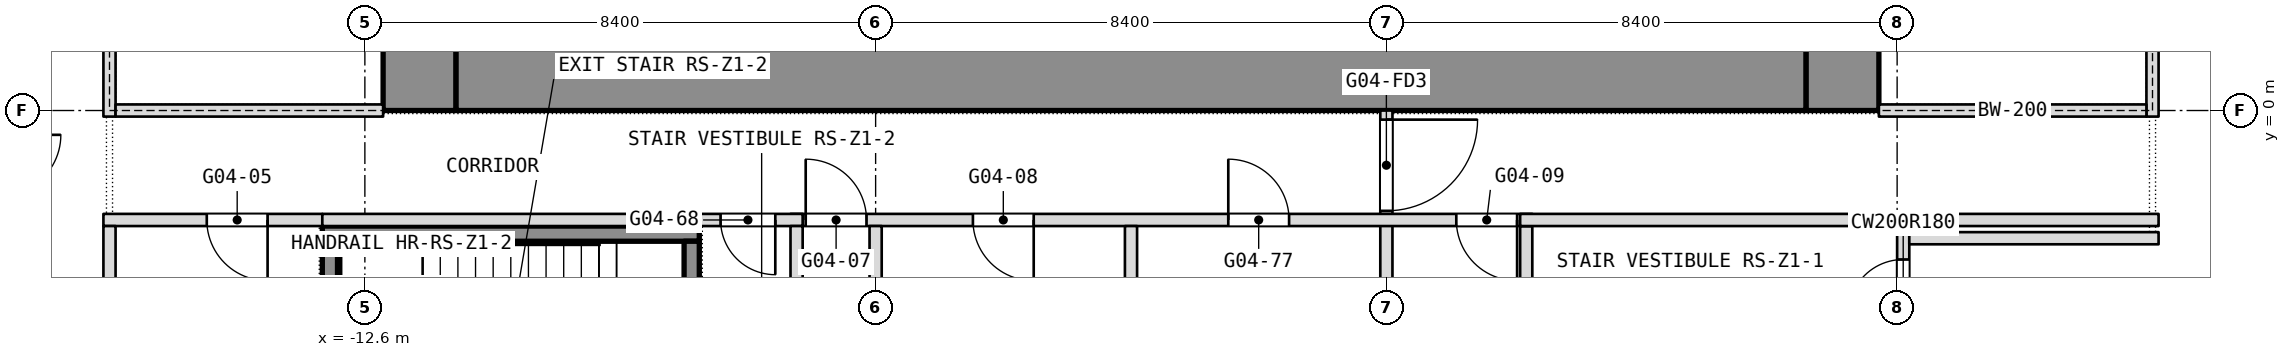
"""IFC4 building model, lengths in metres.
Left out: names, types, materials, properties, quantities, classifications, styles, units other than length and angle.
Written with IfcOpenShell. Run it as: python <this file> out.ifc"""

import sys

from ifc_helpers import new_model, si_unit, direction, frame, frame_2d, origin, place, context, subcontext, project, spatial, rectangle, extrude, element, fill, save


model = new_model("IFC4")
c1 = context("Model", 3, precision=1e-05, world=origin(), true_north=direction((0.0, 1.0)))
c2 = subcontext(c1, "Body", "Model", "MODEL_VIEW")
j1 = project(units=[si_unit("LENGTHUNIT", "METRE"), si_unit("PLANEANGLEUNIT", "RADIAN")], contexts=[c1])
p1 = place(None, origin())
s1 = spatial("IfcSite", under=j1, at=p1, CompositionType="ELEMENT")
p2 = place(p1, origin())
s2 = spatial("IfcBuilding", under=s1, at=p2, CompositionType="ELEMENT")
p3 = place(p2, frame((0.0, 0.0, 61.7)))
s3 = spatial("IfcBuildingStorey", under=s2, at=p3, CompositionType="ELEMENT", Elevation=61.7)
p4 = place(p3, frame((11.7, 0.0, 0.0), z_axis=(0.0, 0.0, 1.0), x_axis=(0.0, 1.0, 0.0)))
e1 = element("IfcWall", 1, at=p4, inside=s3, PredefinedType="SHEAR", context=c2, shape_type="SweptSolid", body=[
    extrude(rectangle(XDim=16.8, YDim=1.2, at=frame_2d((8.4, 0.0))), origin(), (0.0, 0.0, 1.0), 3.6),
])
p5 = place(p4, frame((1.762, 0.0, 0.0)))
e2 = element("IfcOpeningElement", 2, at=p5, cuts=e1, PredefinedType="OPENING", context=c2, shape_type="SweptSolid", body=[
    extrude(rectangle(XDim=0.9, YDim=2.1, at=frame_2d((0.45, 1.05))), frame((0.0, 0.6, 0.0), z_axis=(0.0, -1.0, 0.0), x_axis=(1.0, 0.0, 0.0)), (0.0, 0.0, 1.0), 1.2),
])
p6 = place(p4, frame((4.387, 0.0, 0.0)))
e3 = element("IfcOpeningElement", 3, at=p6, cuts=e1, PredefinedType="OPENING", context=c2, shape_type="SweptSolid", body=[
    extrude(rectangle(XDim=0.9, YDim=2.1, at=frame_2d((0.45, 1.05))), frame((0.0, 0.6, 0.0), z_axis=(0.0, -1.0, 0.0), x_axis=(1.0, 0.0, 0.0)), (0.0, 0.0, 1.0), 1.2),
])
p7 = place(p4, frame((6.825, 0.0, 0.0)))
e4 = element("IfcOpeningElement", 4, at=p7, cuts=e1, PredefinedType="OPENING", context=c2, shape_type="SweptSolid", body=[
    extrude(rectangle(XDim=1.2, YDim=2.1, at=frame_2d((0.6, 1.05))), frame((0.0, 0.6, 0.0), z_axis=(0.0, -1.0, 0.0), x_axis=(1.0, 0.0, 0.0)), (0.0, 0.0, 1.0), 1.2),
])
p8 = place(p4, frame((14.137, 0.0, 0.0)))
e5 = element("IfcOpeningElement", 5, at=p8, cuts=e1, PredefinedType="OPENING", context=c2, shape_type="SweptSolid", body=[
    extrude(rectangle(XDim=0.9, YDim=2.1, at=frame_2d((0.45, 1.05))), frame((0.0, 0.6, 0.0), z_axis=(0.0, -1.0, 0.0), x_axis=(1.0, 0.0, 0.0)), (0.0, 0.0, 1.0), 1.2),
])
p9 = place(p4, frame((11.512, 0.0, 0.0)))
e6 = element("IfcOpeningElement", 6, at=p9, cuts=e1, PredefinedType="OPENING", context=c2, shape_type="SweptSolid", body=[
    extrude(rectangle(XDim=0.9, YDim=2.1, at=frame_2d((0.45, 1.05))), frame((0.0, 0.6, 0.0), z_axis=(0.0, -1.0, 0.0), x_axis=(1.0, 0.0, 0.0)), (0.0, 0.0, 1.0), 1.2),
])
p10 = place(p4, frame((8.775, 0.0, 0.0)))
e7 = element("IfcOpeningElement", 7, at=p10, cuts=e1, PredefinedType="OPENING", context=c2, shape_type="SweptSolid", body=[
    extrude(rectangle(XDim=1.2, YDim=2.1, at=frame_2d((0.6, 1.05))), frame((0.0, 0.6, 0.0), z_axis=(0.0, -1.0, 0.0), x_axis=(1.0, 0.0, 0.0)), (0.0, 0.0, 1.0), 1.2),
])
p11 = place(p3, frame((-11.7, 0.0, 0.0), z_axis=(0.0, 0.0, 1.0), x_axis=(0.0, 1.0, 0.0)))
e8 = element("IfcWall", 8, at=p11, inside=s3, PredefinedType="SHEAR", context=c2, shape_type="SweptSolid", body=[
    extrude(rectangle(XDim=16.8, YDim=1.2, at=frame_2d((8.4, 0.0))), origin(), (0.0, 0.0, 1.0), 3.6),
])
p12 = place(p11, frame((2.3, 0.0, 0.0)))
e9 = element("IfcOpeningElement", 9, at=p12, cuts=e8, PredefinedType="OPENING", context=c2, shape_type="SweptSolid", body=[
    extrude(rectangle(XDim=1.1, YDim=2.1, at=frame_2d((0.55, 1.05))), frame((0.0, 0.6, 0.0), z_axis=(0.0, -1.0, 0.0), x_axis=(1.0, 0.0, 0.0)), (0.0, 0.0, 1.0), 1.2),
])
p13 = place(p11, frame((4.85, 0.0, 0.0)))
e10 = element("IfcOpeningElement", 10, at=p13, cuts=e8, PredefinedType="OPENING", context=c2, shape_type="SweptSolid", body=[
    extrude(rectangle(XDim=1.1, YDim=2.1, at=frame_2d((0.55, 1.05))), frame((0.0, 0.6, 0.0), z_axis=(0.0, -1.0, 0.0), x_axis=(1.0, 0.0, 0.0)), (0.0, 0.0, 1.0), 1.2),
])
p14 = place(p11, frame((6.825, 0.0, 0.0)))
e11 = element("IfcOpeningElement", 11, at=p14, cuts=e8, PredefinedType="OPENING", context=c2, shape_type="SweptSolid", body=[
    extrude(rectangle(XDim=1.2, YDim=2.1, at=frame_2d((0.6, 1.05))), frame((0.0, 0.6, 0.0), z_axis=(0.0, -1.0, 0.0), x_axis=(1.0, 0.0, 0.0)), (0.0, 0.0, 1.0), 1.2),
])
p15 = place(p11, frame((13.4, 0.0, 0.0)))
e12 = element("IfcOpeningElement", 12, at=p15, cuts=e8, PredefinedType="OPENING", context=c2, shape_type="SweptSolid", body=[
    extrude(rectangle(XDim=1.1, YDim=2.1, at=frame_2d((0.55, 1.05))), frame((0.0, 0.6, 0.0), z_axis=(0.0, -1.0, 0.0), x_axis=(1.0, 0.0, 0.0)), (0.0, 0.0, 1.0), 1.2),
])
p16 = place(p11, frame((10.85, 0.0, 0.0)))
e13 = element("IfcOpeningElement", 13, at=p16, cuts=e8, PredefinedType="OPENING", context=c2, shape_type="SweptSolid", body=[
    extrude(rectangle(XDim=1.1, YDim=2.1, at=frame_2d((0.55, 1.05))), frame((0.0, 0.6, 0.0), z_axis=(0.0, -1.0, 0.0), x_axis=(1.0, 0.0, 0.0)), (0.0, 0.0, 1.0), 1.2),
])
p17 = place(p11, frame((8.775, 0.0, 0.0)))
e14 = element("IfcOpeningElement", 14, at=p17, cuts=e8, PredefinedType="OPENING", context=c2, shape_type="SweptSolid", body=[
    extrude(rectangle(XDim=1.2, YDim=2.1, at=frame_2d((0.6, 1.05))), frame((0.0, 0.6, 0.0), z_axis=(0.0, -1.0, 0.0), x_axis=(1.0, 0.0, 0.0)), (0.0, 0.0, 1.0), 1.2),
])
p18 = place(p3, frame((-11.1, 0.6, 0.0), z_axis=(0.0, 0.0, 1.0), x_axis=(1.0, 0.0, 0.0)))
e15 = element("IfcWall", 15, at=p18, inside=s3, PredefinedType="SHEAR", context=c2, shape_type="SweptSolid", body=[
    extrude(rectangle(XDim=22.2, YDim=1.2, at=frame_2d((11.1, 0.0))), origin(), (0.0, 0.0, 1.0), 3.6),
])
p19 = place(p3, frame((12.7, -3.7, 0.0), z_axis=(0.0, 0.0, 1.0), x_axis=(0.0, 1.0, 0.0)))
e16 = element("IfcWall", 16, at=p19, inside=s3, PredefinedType="PARTITIONING", context=c2, shape_type="SweptSolid", body=[
    extrude(rectangle(XDim=1.7, YDim=0.2, at=frame_2d((0.85, 0.0))), origin(), (0.0, 0.0, 1.0), 3.34),
])
p20 = place(p19, frame((0.35, 0.0, 0.0)))
e17 = element("IfcOpeningElement", 17, at=p20, cuts=e16, PredefinedType="OPENING", context=c2, shape_type="SweptSolid", body=[
    extrude(rectangle(XDim=0.9, YDim=2.1, at=frame_2d((0.45, 1.05))), frame((0.0, 0.1, 0.0), z_axis=(0.0, -1.0, 0.0), x_axis=(1.0, 0.0, 0.0)), (0.0, 0.0, 1.0), 0.2),
])
p21 = place(p3, frame((6.5, -3.7, 0.0), z_axis=(0.0, 0.0, 1.0), x_axis=(0.0, 1.0, 0.0)))
e18 = element("IfcWall", 18, at=p21, inside=s3, PredefinedType="PARTITIONING", context=c2, shape_type="SweptSolid", body=[
    extrude(rectangle(XDim=1.8, YDim=0.2, at=frame_2d((0.9, 0.0))), origin(), (0.0, 0.0, 1.0), 3.34),
])
p22 = place(p3, frame((4.2, -12.7, 0.0), z_axis=(0.0, 0.0, 1.0), x_axis=(0.0, 1.0, 0.0)))
e19 = element("IfcWall", 19, at=p22, inside=s3, PredefinedType="PARTITIONING", context=c2, shape_type="SweptSolid", body=[
    extrude(rectangle(XDim=12.7, YDim=0.2, at=frame_2d((6.35, 0.0))), origin(), (0.0, 0.0, 1.0), 3.34),
])
p23 = place(p22, frame((11.05, 0.0, 0.0)))
e20 = element("IfcOpeningElement", 20, at=p23, cuts=e19, PredefinedType="OPENING", context=c2, shape_type="SweptSolid", body=[
    extrude(rectangle(XDim=1.5, YDim=2.1, at=frame_2d((0.75, 1.05))), frame((0.0, 0.1, 0.0), z_axis=(0.0, -1.0, 0.0), x_axis=(1.0, 0.0, 0.0)), (0.0, 0.0, 1.0), 0.2),
])
p24 = place(p22, frame((0.25, 0.0, 0.0)))
e21 = element("IfcOpeningElement", 21, at=p24, cuts=e19, PredefinedType="OPENING", context=c2, shape_type="SweptSolid", body=[
    extrude(rectangle(XDim=1.5, YDim=2.1, at=frame_2d((0.75, 1.05))), frame((0.0, 0.1, 0.0), z_axis=(0.0, -1.0, 0.0), x_axis=(1.0, 0.0, 0.0)), (0.0, 0.0, 1.0), 0.2),
])
p25 = place(p3, frame((12.8, -2.1, 0.0), z_axis=(0.0, 0.0, 1.0), x_axis=(1.0, 0.0, 0.0)))
e22 = element("IfcWall", 22, at=p25, inside=s3, PredefinedType="PARTITIONING", context=c2, shape_type="SweptSolid", body=[
    extrude(rectangle(XDim=4.1, YDim=0.2, at=frame_2d((2.05, 0.0))), origin(), (0.0, 0.0, 1.0), 3.34),
])
p26 = place(p3, frame((-16.9, -1.8, 0.0), z_axis=(0.0, 0.0, 1.0), x_axis=(1.0, 0.0, 0.0)))
e23 = element("IfcWall", 23, at=p26, inside=s3, PredefinedType="PARTITIONING", context=c2, shape_type="SweptSolid", body=[
    extrude(rectangle(XDim=3.6, YDim=0.2, at=frame_2d((1.8, 0.0))), origin(), (0.0, 0.0, 1.0), 3.34),
])
p27 = place(p26, frame((1.7, 0.0, 0.0)))
e24 = element("IfcOpeningElement", 24, at=p27, cuts=e23, PredefinedType="OPENING", context=c2, shape_type="SweptSolid", body=[
    extrude(rectangle(XDim=1.0, YDim=2.1, at=frame_2d((0.5, 1.05))), frame((0.0, 0.1, 0.0), z_axis=(0.0, -1.0, 0.0), x_axis=(1.0, 0.0, 0.0)), (0.0, 0.0, 1.0), 0.2),
])
p28 = place(p3, frame((-5.6, -1.8, 0.0), z_axis=(0.0, 0.0, 1.0), x_axis=(1.0, 0.0, 0.0)))
e25 = element("IfcWall", 25, at=p28, inside=s3, PredefinedType="PARTITIONING", context=c2, shape_type="SweptSolid", body=[
    extrude(rectangle(XDim=12.2, YDim=0.2, at=frame_2d((6.1, 0.0))), origin(), (0.0, 0.0, 1.0), 3.34),
])
p29 = place(p28, frame((0.25, 0.0, 0.0)))
e26 = element("IfcOpeningElement", 26, at=p29, cuts=e25, PredefinedType="OPENING", context=c2, shape_type="SweptSolid", body=[
    extrude(rectangle(XDim=1.0, YDim=2.1, at=frame_2d((0.5, 1.05))), frame((0.0, 0.1, 0.0), z_axis=(0.0, -1.0, 0.0), x_axis=(1.0, 0.0, 0.0)), (0.0, 0.0, 1.0), 0.2),
])
p30 = place(p28, frame((3.0, 0.0, 0.0)))
e27 = element("IfcOpeningElement", 27, at=p30, cuts=e25, PredefinedType="OPENING", context=c2, shape_type="SweptSolid", body=[
    extrude(rectangle(XDim=1.0, YDim=2.1, at=frame_2d((0.5, 1.05))), frame((0.0, 0.1, 0.0), z_axis=(0.0, -1.0, 0.0), x_axis=(1.0, 0.0, 0.0)), (0.0, 0.0, 1.0), 0.2),
])
p31 = place(p28, frame((10.95, 0.0, 0.0)))
e28 = element("IfcOpeningElement", 28, at=p31, cuts=e25, PredefinedType="OPENING", context=c2, shape_type="SweptSolid", body=[
    extrude(rectangle(XDim=1.0, YDim=2.1, at=frame_2d((0.5, 1.05))), frame((0.0, 0.1, 0.0), z_axis=(0.0, -1.0, 0.0), x_axis=(1.0, 0.0, 0.0)), (0.0, 0.0, 1.0), 0.2),
])
p32 = place(p28, frame((7.2, 0.0, 0.0)))
e29 = element("IfcOpeningElement", 29, at=p32, cuts=e25, PredefinedType="OPENING", context=c2, shape_type="SweptSolid", body=[
    extrude(rectangle(XDim=1.0, YDim=2.1, at=frame_2d((0.5, 1.05))), frame((0.0, 0.1, 0.0), z_axis=(0.0, -1.0, 0.0), x_axis=(1.0, 0.0, 0.0)), (0.0, 0.0, 1.0), 0.2),
])
p33 = place(p3, frame((-13.3, -1.8, 0.0), z_axis=(0.0, 0.0, 1.0), x_axis=(1.0, 0.0, 0.0)))
e30 = element("IfcWall", 30, at=p33, inside=s3, PredefinedType="PARTITIONING", context=c2, shape_type="SweptSolid", body=[
    extrude(rectangle(XDim=7.9, YDim=0.2, at=frame_2d((3.95, 0.0))), origin(), (0.0, 0.0, 1.0), 3.34),
])
p34 = place(p33, frame((6.55, 0.0, 0.0)))
e31 = element("IfcOpeningElement", 31, at=p34, cuts=e30, PredefinedType="OPENING", context=c2, shape_type="SweptSolid", body=[
    extrude(rectangle(XDim=0.9, YDim=2.1, at=frame_2d((0.45, 1.05))), frame((0.0, 0.1, 0.0), z_axis=(0.0, -1.0, 0.0), x_axis=(1.0, 0.0, 0.0)), (0.0, 0.0, 1.0), 0.2),
])
p35 = place(p3, frame((6.4, -1.8, 0.0), z_axis=(0.0, 0.0, 1.0), x_axis=(1.0, 0.0, 0.0)))
e32 = element("IfcWall", 32, at=p35, inside=s3, PredefinedType="PARTITIONING", context=c2, shape_type="SweptSolid", body=[
    extrude(rectangle(XDim=10.5, YDim=0.2, at=frame_2d((5.25, 0.0))), origin(), (0.0, 0.0, 1.0), 3.34),
])
for number, where, z_axis, x_axis in (
    (33, (0.0, -10.7, 0.0), (0.0, 0.0, 1.0), (0.0, 1.0, 0.0)),
    (34, (-4.2, -10.7, 0.0), (0.0, 0.0, 1.0), (0.0, 1.0, 0.0)),
):
    element("IfcWall", number, at=place(p3, frame(where, z_axis=z_axis, x_axis=x_axis)), inside=s3, PredefinedType="PARTITIONING", context=c2, shape_type="SweptSolid", body=[
        extrude(rectangle(XDim=8.8, YDim=0.2, at=frame_2d((4.4, 0.0))), origin(), (0.0, 0.0, 1.0), 3.34),
    ])
p36 = place(p3, frame((-5.5, -5.2, 0.0), z_axis=(0.0, 0.0, 1.0), x_axis=(0.0, 1.0, 0.0)))
e35 = element("IfcWall", 35, at=p36, inside=s3, PredefinedType="PARTITIONING", context=c2, shape_type="SweptSolid", body=[
    extrude(rectangle(XDim=3.3, YDim=0.2, at=frame_2d((1.65, 0.0))), origin(), (0.0, 0.0, 1.0), 3.34),
])
p37 = place(p3, frame((-16.8, -10.9, 0.0), z_axis=(0.0, 0.0, 1.0), x_axis=(0.0, 1.0, 0.0)))
e36 = element("IfcWall", 36, at=p37, inside=s3, PredefinedType="PARTITIONING", context=c2, shape_type="SweptSolid", body=[
    extrude(rectangle(XDim=9.0, YDim=0.2, at=frame_2d((4.5, 0.0))), origin(), (0.0, 0.0, 1.0), 3.34),
])
p38 = place(p3, frame((-16.8, -0.1, 0.0), z_axis=(0.0, 0.0, 1.0), x_axis=(0.0, 1.0, 0.0)))
e37 = element("IfcWall", 37, at=p38, inside=s3, PredefinedType="PARTITIONING", context=c2, shape_type="SweptSolid", body=[
    extrude(rectangle(XDim=17.0, YDim=0.2, at=frame_2d((8.5, 0.0))), origin(), (0.0, 0.0, 1.0), 3.34),
])
p39 = place(p38, frame((2.2, 0.0, 0.0)))
e38 = element("IfcOpeningElement", 38, at=p39, cuts=e37, PredefinedType="OPENING", context=c2, shape_type="SweptSolid", body=[
    extrude(rectangle(XDim=1.8, YDim=2.1, at=frame_2d((0.9, 1.05))), frame((0.0, 0.1, 0.0), z_axis=(0.0, -1.0, 0.0), x_axis=(1.0, 0.0, 0.0)), (0.0, 0.0, 1.0), 0.2),
])
p40 = place(p38, frame((7.2, 0.0, 0.0)))
e39 = element("IfcOpeningElement", 39, at=p40, cuts=e37, PredefinedType="OPENING", context=c2, shape_type="SweptSolid", body=[
    extrude(rectangle(XDim=1.8, YDim=2.1, at=frame_2d((0.9, 1.05))), frame((0.0, 0.1, 0.0), z_axis=(0.0, -1.0, 0.0), x_axis=(1.0, 0.0, 0.0)), (0.0, 0.0, 1.0), 0.2),
])
p41 = place(p3, frame((-16.7, 0.0, 0.0), z_axis=(0.0, 0.0, 1.0), x_axis=(1.0, 0.0, 0.0)))
e40 = element("IfcWall", 40, at=p41, inside=s3, PredefinedType="PARTITIONING", context=c2, shape_type="SweptSolid", body=[
    extrude(rectangle(XDim=4.4, YDim=0.2, at=frame_2d((2.2, 0.0))), origin(), (0.0, 0.0, 1.0), 2.84),
])
p42 = place(p3, frame((16.8, -0.1, 0.0), z_axis=(0.0, 0.0, 1.0), x_axis=(0.0, 1.0, 0.0)))
e41 = element("IfcWall", 41, at=p42, inside=s3, PredefinedType="PARTITIONING", context=c2, shape_type="SweptSolid", body=[
    extrude(rectangle(XDim=17.0, YDim=0.2, at=frame_2d((8.5, 0.0))), origin(), (0.0, 0.0, 1.0), 3.34),
])
p43 = place(p42, frame((2.2, 0.0, 0.0)))
e42 = element("IfcOpeningElement", 42, at=p43, cuts=e41, PredefinedType="OPENING", context=c2, shape_type="SweptSolid", body=[
    extrude(rectangle(XDim=1.8, YDim=2.1, at=frame_2d((0.9, 1.05))), frame((0.0, 0.1, 0.0), z_axis=(0.0, -1.0, 0.0), x_axis=(1.0, 0.0, 0.0)), (0.0, 0.0, 1.0), 0.2),
])
p44 = place(p42, frame((13.0, 0.0, 0.0)))
e43 = element("IfcOpeningElement", 43, at=p44, cuts=e41, PredefinedType="OPENING", context=c2, shape_type="SweptSolid", body=[
    extrude(rectangle(XDim=1.8, YDim=2.1, at=frame_2d((0.9, 1.05))), frame((0.0, 0.1, 0.0), z_axis=(0.0, -1.0, 0.0), x_axis=(1.0, 0.0, 0.0)), (0.0, 0.0, 1.0), 0.2),
])
p45 = place(p3, frame((12.3, 0.0, 0.0), z_axis=(0.0, 0.0, 1.0), x_axis=(1.0, 0.0, 0.0)))
e44 = element("IfcWall", 44, at=p45, inside=s3, PredefinedType="PARTITIONING", context=c2, shape_type="SweptSolid", body=[
    extrude(rectangle(XDim=4.4, YDim=0.2, at=frame_2d((2.2, 0.0))), origin(), (0.0, 0.0, 1.0), 2.84),
])
p46 = place(p3, frame((-13.3, -2.025, 0.1), z_axis=(0.0, 0.0, 1.0), x_axis=(1.0, 0.0, 0.0)))
e45 = element("IfcWall", 45, at=p46, inside=s3, PredefinedType="SHEAR", context=c2, shape_type="SweptSolid", body=[
    extrude(rectangle(XDim=6.2, YDim=0.25, at=frame_2d((3.1, 0.0))), origin(), (0.0, 0.0, 1.0), 3.6),
])
p47 = place(p3, frame((-13.175, -5.05, 0.1), z_axis=(0.0, 0.0, 1.0), x_axis=(0.0, 1.0, 0.0)))
e46 = element("IfcWall", 46, at=p47, inside=s3, PredefinedType="SHEAR", context=c2, shape_type="SweptSolid", body=[
    extrude(rectangle(XDim=2.9, YDim=0.25, at=frame_2d((1.45, 0.0))), origin(), (0.0, 0.0, 1.0), 3.6),
])
p48 = place(p3, frame((-7.225, -5.05, 0.1), z_axis=(0.0, 0.0, 1.0), x_axis=(0.0, 1.0, 0.0)))
e47 = element("IfcWall", 47, at=p48, inside=s3, PredefinedType="SHEAR", context=c2, shape_type="SweptSolid", body=[
    extrude(rectangle(XDim=2.9, YDim=0.25, at=frame_2d((1.45, 0.0))), origin(), (0.0, 0.0, 1.0), 3.6),
])
p49 = place(p48, frame((0.95, 0.0, 0.0)))
e48 = element("IfcOpeningElement", 48, at=p49, cuts=e47, PredefinedType="OPENING", context=c2, shape_type="SweptSolid", body=[
    extrude(rectangle(XDim=1.0, YDim=2.1, at=frame_2d((0.5, 1.05))), frame((0.0, 0.125, 0.0), z_axis=(0.0, -1.0, 0.0), x_axis=(1.0, 0.0, 0.0)), (0.0, 0.0, 1.0), 0.25),
])
p50 = place(p20, origin())
e49 = element("IfcDoor", 49, at=p50, inside=s3, OperationType="SINGLE_SWING_RIGHT", PredefinedType="DOOR", context=c2, shape_type="SweptSolid", body=[
    extrude(rectangle(XDim=0.9, YDim=2.1, at=frame_2d((0.45, 1.05))), frame((0.0, 0.025, 0.0), z_axis=(0.0, -1.0, 0.0), x_axis=(1.0, 0.0, 0.0)), (0.0, 0.0, 1.0), 0.05),
])
fill(e17, e49)
p51 = place(p27, origin())
e50 = element("IfcDoor", 50, at=p51, inside=s3, OperationType="SINGLE_SWING_RIGHT", PredefinedType="DOOR", context=c2, shape_type="SweptSolid", body=[
    extrude(rectangle(XDim=1.0, YDim=2.1, at=frame_2d((0.5, 1.05))), frame((0.0, 0.025, 0.0), z_axis=(0.0, -1.0, 0.0), x_axis=(1.0, 0.0, 0.0)), (0.0, 0.0, 1.0), 0.05),
])
fill(e24, e50)
p52 = place(p29, origin())
e51 = element("IfcDoor", 51, at=p52, inside=s3, OperationType="SINGLE_SWING_RIGHT", PredefinedType="DOOR", context=c2, shape_type="SweptSolid", body=[
    extrude(rectangle(XDim=1.0, YDim=2.1, at=frame_2d((0.5, 1.05))), frame((0.0, 0.025, 0.0), z_axis=(0.0, -1.0, 0.0), x_axis=(1.0, 0.0, 0.0)), (0.0, 0.0, 1.0), 0.05),
])
fill(e26, e51)
p53 = place(p30, origin())
e52 = element("IfcDoor", 52, at=p53, inside=s3, OperationType="SINGLE_SWING_LEFT", PredefinedType="DOOR", context=c2, shape_type="SweptSolid", body=[
    extrude(rectangle(XDim=1.0, YDim=2.1, at=frame_2d((0.5, 1.05))), frame((0.0, 0.025, 0.0), z_axis=(0.0, -1.0, 0.0), x_axis=(1.0, 0.0, 0.0)), (0.0, 0.0, 1.0), 0.05),
])
fill(e27, e52)
p54 = place(p31, origin())
e53 = element("IfcDoor", 53, at=p54, inside=s3, OperationType="SINGLE_SWING_RIGHT", PredefinedType="DOOR", context=c2, shape_type="SweptSolid", body=[
    extrude(rectangle(XDim=1.0, YDim=2.1, at=frame_2d((0.5, 1.05))), frame((0.0, 0.025, 0.0), z_axis=(0.0, -1.0, 0.0), x_axis=(1.0, 0.0, 0.0)), (0.0, 0.0, 1.0), 0.05),
])
fill(e28, e53)
p55 = place(p32, origin())
e54 = element("IfcDoor", 54, at=p55, inside=s3, OperationType="SINGLE_SWING_RIGHT", PredefinedType="DOOR", context=c2, shape_type="SweptSolid", body=[
    extrude(rectangle(XDim=1.0, YDim=2.1, at=frame_2d((0.5, 1.05))), frame((0.0, 0.025, 0.0), z_axis=(0.0, -1.0, 0.0), x_axis=(1.0, 0.0, 0.0)), (0.0, 0.0, 1.0), 0.05),
])
fill(e29, e54)
p56 = place(p34, origin())
e55 = element("IfcDoor", 55, at=p56, inside=s3, OperationType="SINGLE_SWING_LEFT", PredefinedType="DOOR", context=c2, shape_type="SweptSolid", body=[
    extrude(rectangle(XDim=0.9, YDim=2.1, at=frame_2d((0.45, 1.05))), frame((0.0, 0.025, 0.0), z_axis=(0.0, -1.0, 0.0), x_axis=(1.0, 0.0, 0.0)), (0.0, 0.0, 1.0), 0.05),
])
fill(e31, e55)
p57 = place(p23, origin())
e56 = element("IfcDoor", 56, at=p57, inside=s3, OperationType="DOUBLE_DOOR_DOUBLE_SWING", PredefinedType="DOOR", context=c2, shape_type="SweptSolid", body=[
    extrude(rectangle(XDim=1.5, YDim=2.1, at=frame_2d((0.75, 1.05))), frame((0.0, 0.025, 0.0), z_axis=(0.0, -1.0, 0.0), x_axis=(1.0, 0.0, 0.0)), (0.0, 0.0, 1.0), 0.05),
])
fill(e20, e56)
save(model, sys.argv[1])
